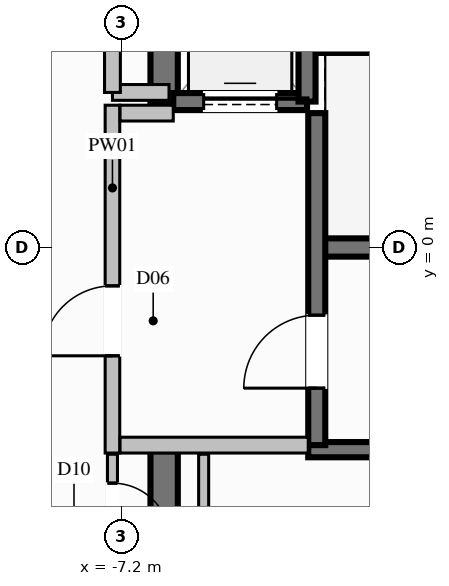
"""IFC4 building model, lengths in metres.
Left out: names, types, materials, properties, quantities, classifications, styles, units other than length and angle.
Written with IfcOpenShell. Run it as: python <this file> out.ifc"""

import sys

from ifc_helpers import new_model, si_unit, direction, frame, frame_2d, origin, place, context, subcontext, project, spatial, rectangle, extrude, element, fill, save


model = new_model("IFC4")
c1 = context("Model", 3, precision=1e-05, world=origin(), true_north=direction((0.0, 1.0)))
c2 = subcontext(c1, "Body", "Model", "MODEL_VIEW")
j1 = project(units=[si_unit("LENGTHUNIT", "METRE"), si_unit("PLANEANGLEUNIT", "RADIAN")], contexts=[c1])
p1 = place(None, origin())
s1 = spatial("IfcSite", under=j1, at=p1, CompositionType="ELEMENT")
p2 = place(p1, origin())
s2 = spatial("IfcBuilding", under=s1, at=p2, CompositionType="ELEMENT")
p3 = place(p2, frame((0.0, 0.0, 254.4)))
s3 = spatial("IfcBuildingStorey", under=s2, at=p3, CompositionType="ELEMENT", Elevation=254.4)
p4 = place(p3, frame((-3.99, 0.0, 0.0), z_axis=(0.0, 0.0, 1.0), x_axis=(1.0, 0.0, 0.0)))
e1 = element("IfcWall", 1, at=p4, inside=s3, PredefinedType="SHEAR", context=c2, shape_type="SweptSolid", body=[
    extrude(rectangle(XDim=7.98, YDim=0.3, at=frame_2d((3.99, 0.0))), origin(), (0.0, 0.0, 1.0), 3.8),
])
for number, where, z_axis, x_axis in (
    (2, (-4.13, -3.325, 0.0), (0.0, 0.0, 1.0), (1.0, 0.0, 0.0)),
    (3, (-4.13, 3.325, 0.0), (0.0, 0.0, 1.0), (1.0, 0.0, 0.0)),
):
    element("IfcWall", number, at=place(p3, frame(where, z_axis=z_axis, x_axis=x_axis)), inside=s3, PredefinedType="SOLIDWALL", context=c2, shape_type="SweptSolid", body=[
        extrude(rectangle(XDim=8.26, YDim=0.25, at=frame_2d((4.13, 0.0))), origin(), (0.0, 0.0, 1.0), 3.8),
    ])
p5 = place(p3, frame((-6.5, 2.35, 0.0), z_axis=(0.0, 0.0, 1.0), x_axis=(0.0, 1.0, 0.0)))
e4 = element("IfcWall", 4, at=p5, inside=s3, PredefinedType="SHEAR", context=c2, shape_type="SweptSolid", body=[
    extrude(rectangle(XDim=3.975, YDim=0.45, at=frame_2d((1.987, 0.0))), origin(), (0.0, 0.0, 1.0), 3.8),
])
p6 = place(p3, frame((-6.5, -6.325, 0.0), z_axis=(0.0, 0.0, 1.0), x_axis=(0.0, 1.0, 0.0)))
e5 = element("IfcWall", 5, at=p6, inside=s3, PredefinedType="SHEAR", context=c2, shape_type="SweptSolid", body=[
    extrude(rectangle(XDim=2.975, YDim=0.45, at=frame_2d((1.487, 0.0))), origin(), (0.0, 0.0, 1.0), 3.8),
])
p7 = place(p3, frame((-6.35, 2.4, 0.0), z_axis=(0.0, 0.0, 1.0), x_axis=(1.0, 0.0, 0.0)))
e6 = element("IfcWall", 6, at=p7, inside=s3, PredefinedType="SOLIDWALL", context=c2, shape_type="SweptSolid", body=[
    extrude(rectangle(XDim=2.2, YDim=0.28, at=frame_2d((1.1, 0.0))), origin(), (0.0, 0.0, 1.0), 3.57),
])
p8 = place(p7, frame((0.5, 0.0, 0.0)))
e7 = element("IfcOpeningElement", 7, at=p8, cuts=e6, PredefinedType="OPENING", context=c2, shape_type="SweptSolid", body=[
    extrude(rectangle(XDim=1.2, YDim=2.2, at=frame_2d((0.6, 1.1))), frame((0.0, 0.15, 0.0), z_axis=(0.0, -1.0, 0.0), x_axis=(1.0, 0.0, 0.0)), (0.0, 0.0, 1.0), 0.3),
])
p9 = place(p3, frame((-4.15, 2.4, 0.0), z_axis=(0.0, 0.0, 1.0), x_axis=(0.0, 1.0, 0.0)))
e8 = element("IfcWall", 8, at=p9, inside=s3, PredefinedType="SOLIDWALL", context=c2, shape_type="SweptSolid", body=[
    extrude(rectangle(XDim=2.7, YDim=0.28, at=frame_2d((1.35, 0.0))), origin(), (0.0, 0.0, 1.0), 3.57),
])
p10 = place(p3, frame((-3.99, -3.25, 0.0), z_axis=(0.0, 0.0, 1.0), x_axis=(0.0, 1.0, 0.0)))
e9 = element("IfcWall", 9, at=p10, inside=s3, PredefinedType="SOLIDWALL", context=c2, shape_type="SweptSolid", body=[
    extrude(rectangle(XDim=5.46, YDim=0.28, at=frame_2d((2.73, 0.0))), origin(), (0.0, 0.0, 1.0), 3.57),
])
p11 = place(p10, frame((0.937, 0.0, 0.0)))
e10 = element("IfcOpeningElement", 10, at=p11, cuts=e9, PredefinedType="OPENING", context=c2, shape_type="SweptSolid", body=[
    extrude(rectangle(XDim=1.2, YDim=2.2, at=frame_2d((0.6, 1.1))), frame((0.0, 0.15, 0.0), z_axis=(0.0, -1.0, 0.0), x_axis=(1.0, 0.0, 0.0)), (0.0, 0.0, 1.0), 0.3),
])
p12 = place(p3, frame((-7.35, -3.38, 0.0), z_axis=(0.0, 0.0, 1.0), x_axis=(0.0, 1.0, 0.0)))
e11 = element("IfcWall", 11, at=p12, inside=s3, PredefinedType="PARTITIONING", context=c2, shape_type="SweptSolid", body=[
    extrude(rectangle(XDim=5.72, YDim=0.24, at=frame_2d((2.86, 0.0))), origin(), (0.0, 0.0, 1.0), 2.655),
])
p13 = place(p12, frame((1.599, 0.0, 0.0)))
e12 = element("IfcOpeningElement", 12, at=p13, cuts=e11, PredefinedType="OPENING", context=c2, shape_type="SweptSolid", body=[
    extrude(rectangle(XDim=1.15, YDim=2.2, at=frame_2d((0.575, 1.1))), frame((0.0, 0.13, 0.0), z_axis=(0.0, -1.0, 0.0), x_axis=(1.0, 0.0, 0.0)), (0.0, 0.0, 1.0), 0.26),
])
p14 = place(p3, frame((-7.225, -3.25, 0.0), z_axis=(0.0, 0.0, 1.0), x_axis=(1.0, 0.0, 0.0)))
e13 = element("IfcWall", 13, at=p14, inside=s3, PredefinedType="PARTITIONING", context=c2, shape_type="SweptSolid", body=[
    extrude(rectangle(XDim=3.095, YDim=0.26, at=frame_2d((1.548, 0.0))), origin(), (0.0, 0.0, 1.0), 3.57),
])
p15 = place(p3, frame((-7.225, 2.21, 0.0), z_axis=(0.0, 0.0, 1.0), x_axis=(1.0, 0.0, 0.0)))
e14 = element("IfcWall", 14, at=p15, inside=s3, PredefinedType="PARTITIONING", context=c2, shape_type="SweptSolid", body=[
    extrude(rectangle(XDim=0.875, YDim=0.26, at=frame_2d((0.438, 0.0))), origin(), (0.0, 0.0, 1.0), 3.57),
])
p16 = place(p3, frame((-7.35, 2.55, 0.0), z_axis=(0.0, 0.0, 1.0), x_axis=(1.0, 0.0, 0.0)))
e15 = element("IfcWall", 15, at=p16, inside=s3, PredefinedType="PARTITIONING", context=c2, shape_type="SweptSolid", body=[
    extrude(rectangle(XDim=0.93, YDim=0.26, at=frame_2d((0.465, 0.0))), origin(), (0.0, 0.0, 1.0), 3.57),
])
p17 = place(p3, frame((-7.35, 2.55, 0.0), z_axis=(0.0, 0.0, 1.0), x_axis=(0.0, 1.0, 0.0)))
e16 = element("IfcWall", 16, at=p17, inside=s3, PredefinedType="PARTITIONING", context=c2, shape_type="SweptSolid", body=[
    extrude(rectangle(XDim=2.4, YDim=0.26, at=frame_2d((1.2, 0.0))), origin(), (0.0, 0.0, 1.0), 2.655),
])
p18 = place(p17, frame((0.775, 0.0, 0.0)))
e17 = element("IfcOpeningElement", 17, at=p18, cuts=e16, PredefinedType="OPENING", context=c2, shape_type="SweptSolid", body=[
    extrude(rectangle(XDim=0.85, YDim=2.05, at=frame_2d((0.425, 1.025))), frame((0.0, 0.14, 0.0), z_axis=(0.0, -1.0, 0.0), x_axis=(1.0, 0.0, 0.0)), (0.0, 0.0, 1.0), 0.28),
])
p19 = place(p3, frame((-5.85, -5.3, 0.0), z_axis=(0.0, 0.0, 1.0), x_axis=(0.0, 1.0, 0.0)))
e18 = element("IfcWall", 18, at=p19, inside=s3, PredefinedType="PARTITIONING", context=c2, shape_type="SweptSolid", body=[
    extrude(rectangle(XDim=1.9, YDim=0.165, at=frame_2d((0.95, 0.0))), origin(), (0.0, 0.0, 1.0), 2.655),
])
p20 = place(p3, frame((-7.35, -3.4, 0.0), z_axis=(0.0, 0.0, 1.0), x_axis=(0.0, -1.0, 0.0)))
e19 = element("IfcWall", 19, at=p20, inside=s3, PredefinedType="PARTITIONING", context=c2, shape_type="SweptSolid", body=[
    extrude(rectangle(XDim=1.9, YDim=0.165, at=frame_2d((0.95, 0.0))), origin(), (0.0, 0.0, 1.0), 3.57),
])
p21 = place(p20, frame((0.475, 0.0, 0.0)))
e20 = element("IfcOpeningElement", 20, at=p21, cuts=e19, PredefinedType="OPENING", context=c2, shape_type="SweptSolid", body=[
    extrude(rectangle(XDim=0.95, YDim=2.1, at=frame_2d((0.475, 1.05))), frame((0.0, 0.093, 0.0), z_axis=(0.0, -1.0, 0.0), x_axis=(1.0, 0.0, 0.0)), (0.0, 0.0, 1.0), 0.185),
])
p22 = place(p8, origin())
e21 = element("IfcDoor", 21, at=p22, inside=s3, OperationType="SLIDING_TO_LEFT", PredefinedType="DOOR", context=c2, shape_type="SweptSolid", body=[
    extrude(rectangle(XDim=1.2, YDim=2.2, at=frame_2d((0.6, 1.1))), frame((0.0, 0.025, 0.0), z_axis=(0.0, -1.0, 0.0), x_axis=(1.0, 0.0, 0.0)), (0.0, 0.0, 1.0), 0.05),
])
fill(e7, e21)
p23 = place(p11, origin())
e22 = element("IfcDoor", 22, at=p23, inside=s3, OperationType="SINGLE_SWING_LEFT", PredefinedType="DOOR", context=c2, shape_type="SweptSolid", body=[
    extrude(rectangle(XDim=1.2, YDim=2.2, at=frame_2d((0.6, 1.1))), frame((0.0, 0.025, 0.0), z_axis=(0.0, -1.0, 0.0), x_axis=(1.0, 0.0, 0.0)), (0.0, 0.0, 1.0), 0.05),
])
fill(e10, e22)
p24 = place(p13, origin())
e23 = element("IfcDoor", 23, at=p24, inside=s3, OperationType="SINGLE_SWING_LEFT", PredefinedType="DOOR", context=c2, shape_type="SweptSolid", body=[
    extrude(rectangle(XDim=1.15, YDim=2.2, at=frame_2d((0.575, 1.1))), frame((0.0, 0.025, 0.0), z_axis=(0.0, -1.0, 0.0), x_axis=(1.0, 0.0, 0.0)), (0.0, 0.0, 1.0), 0.05),
])
fill(e12, e23)
p25 = place(p21, origin())
e24 = element("IfcDoor", 24, at=p25, inside=s3, OperationType="SINGLE_SWING_RIGHT", PredefinedType="DOOR", context=c2, shape_type="SweptSolid", body=[
    extrude(rectangle(XDim=0.95, YDim=2.1, at=frame_2d((0.475, 1.05))), frame((0.0, 0.025, 0.0), z_axis=(0.0, -1.0, 0.0), x_axis=(1.0, 0.0, 0.0)), (0.0, 0.0, 1.0), 0.05),
])
fill(e20, e24)
save(model, sys.argv[1])
